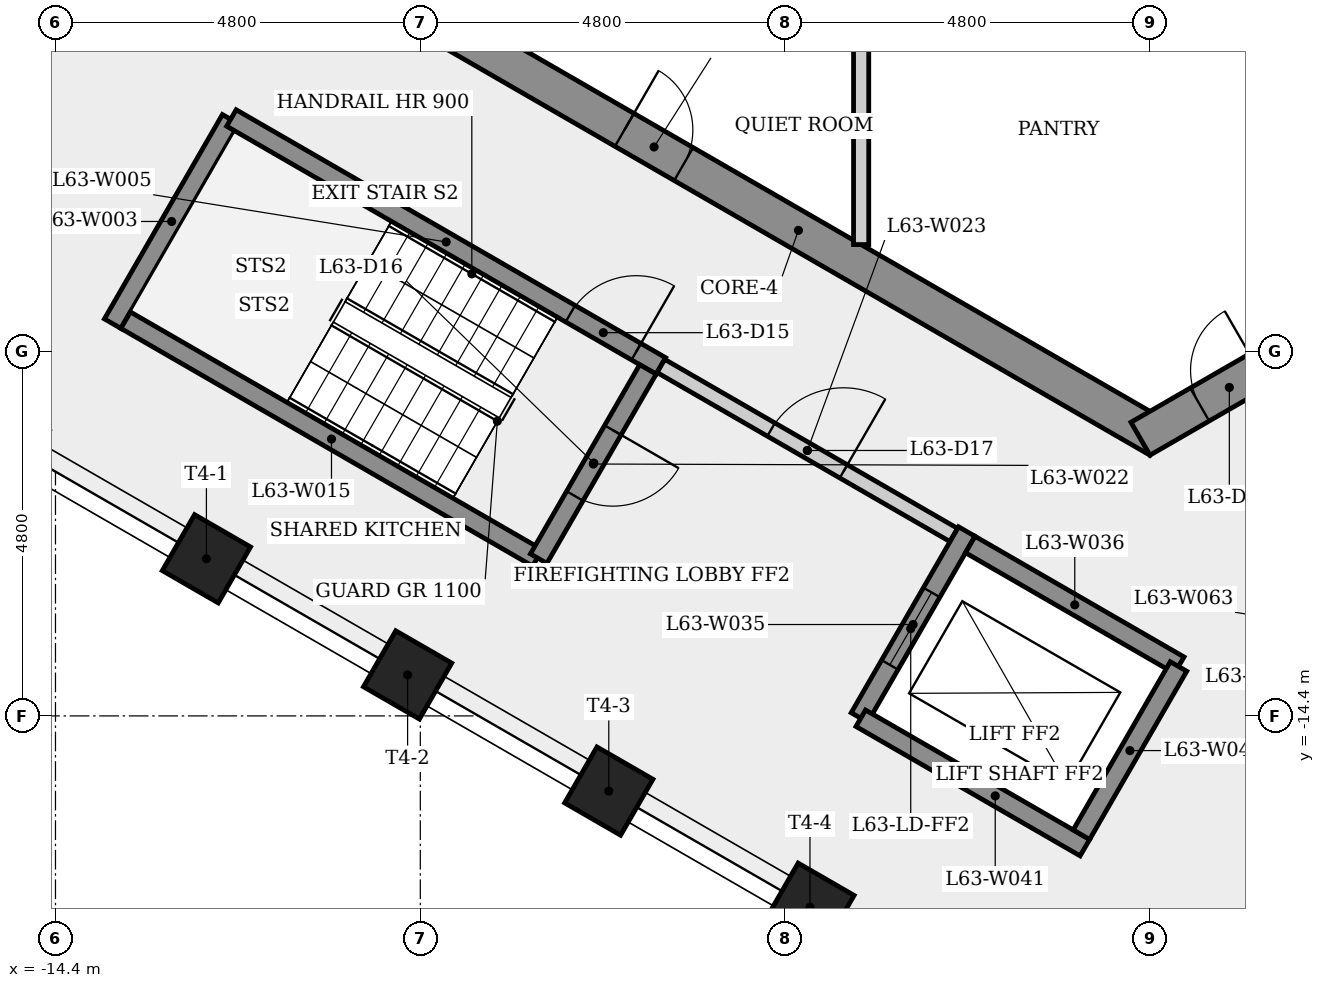
"""IFC4 building model, lengths in metres.
Left out: names, types, materials, properties, quantities, classifications, styles, units other than length and angle.
Written with IfcOpenShell. Run it as: python <this file> out.ifc"""

import sys

from ifc_helpers import new_model, si_unit, direction, frame, frame_2d, origin, origin_2d, place, context, subcontext, project, spatial, rectangle, extrude, element, fill, save


model = new_model("IFC4")
c1 = context("Model", 3, precision=1e-05, world=origin(), true_north=direction((0.0, 1.0)))
c2 = subcontext(c1, "Body", "Model", "MODEL_VIEW")
j1 = project(units=[si_unit("LENGTHUNIT", "METRE"), si_unit("PLANEANGLEUNIT", "RADIAN")], contexts=[c1])
p1 = place(None, origin())
s1 = spatial("IfcSite", under=j1, at=p1, CompositionType="ELEMENT")
p2 = place(p1, origin())
s2 = spatial("IfcBuilding", under=s1, at=p2, CompositionType="ELEMENT")
p3 = place(p2, frame((0.0, 0.0, 235.9)))
s3 = spatial("IfcBuildingStorey", under=s2, at=p3, CompositionType="ELEMENT", Elevation=235.9)
p4 = place(p3, frame((-9.375, -5.268, 0.0), z_axis=(0.0, 0.0, 1.0), x_axis=(0.866023993627, -0.500002442456, 0.0)))
e1 = element("IfcWall", 1, at=p4, inside=s3, PredefinedType="SHEAR", context=c2, shape_type="SweptSolid", body=[
    extrude(rectangle(XDim=10.97, YDim=0.5, at=frame_2d((5.485, 0.0))), origin(), (0.0, 0.0, 1.0), 3.4),
])
p5 = place(p4, frame((2.842, 0.0, 0.0)))
e2 = element("IfcOpeningElement", 2, at=p5, cuts=e1, PredefinedType="OPENING", context=c2, shape_type="SweptSolid", body=[
    extrude(rectangle(XDim=0.9, YDim=2.1, at=frame_2d((0.45, 1.05))), frame((0.0, 0.26, 0.0), z_axis=(0.0, -1.0, 0.0), x_axis=(1.0, 0.0, 0.0)), (0.0, 0.0, 1.0), 0.52),
])
p6 = place(p3, frame((-0.125, -10.753, 0.0), z_axis=(0.0, 0.0, 1.0), x_axis=(0.866023993627, 0.500002442456, 0.0)))
e3 = element("IfcWall", 3, at=p6, inside=s3, PredefinedType="SHEAR", context=c2, shape_type="SweptSolid", body=[
    extrude(rectangle(XDim=10.97, YDim=0.5, at=frame_2d((5.485, 0.0))), origin(), (0.0, 0.0, 1.0), 3.4),
])
p7 = place(p6, frame((0.9, 0.0, 0.0)))
e4 = element("IfcOpeningElement", 4, at=p7, cuts=e3, PredefinedType="OPENING", context=c2, shape_type="SweptSolid", body=[
    extrude(rectangle(XDim=0.9, YDim=2.1, at=frame_2d((0.45, 1.05))), frame((0.0, 0.26, 0.0), z_axis=(0.0, -1.0, 0.0), x_axis=(1.0, 0.0, 0.0)), (0.0, 0.0, 1.0), 0.52),
])
p8 = place(p6, frame((7.542, 0.0, 0.0)))
e5 = element("IfcOpeningElement", 5, at=p8, cuts=e3, PredefinedType="OPENING", context=c2, shape_type="SweptSolid", body=[
    extrude(rectangle(XDim=0.9, YDim=2.1, at=frame_2d((0.45, 1.05))), frame((0.0, 0.26, 0.0), z_axis=(0.0, -1.0, 0.0), x_axis=(1.0, 0.0, 0.0)), (0.0, 0.0, 1.0), 0.52),
])
for number, where, z_axis, x_axis in (
    (6, (-12.414, -12.333, 0.0), (0.0, 0.0, 1.0), (-0.5, -0.866, 0.0)),
    (7, (-9.767, -13.861, 0.0), (0.0, 0.0, 1.0), (-0.5, -0.866, 0.0)),
    (8, (-7.12, -15.389, 0.0), (0.0, 0.0, 1.0), (-0.5, -0.866, 0.0)),
    (9, (-4.473, -16.917, 0.0), (0.0, 0.0, 1.0), (-0.5, -0.866, 0.0)),
):
    element("IfcColumn", number, at=place(p3, frame(where, z_axis=z_axis, x_axis=x_axis)), inside=s3, PredefinedType="COLUMN", context=c2, shape_type="SweptSolid", body=[
        extrude(rectangle(XDim=0.85, YDim=0.85, at=origin_2d()), origin(), (0.0, 0.0, 1.0), 3.4),
    ])
p9 = place(p3, frame((-13.648, -9.239, 0.0), z_axis=(0.0, 0.0, 1.0), x_axis=(0.500003782172, 0.866023220135, 0.0)))
e10 = element("IfcWall", 10, at=p9, inside=s3, PredefinedType="SHEAR", context=c2, shape_type="SweptSolid", body=[
    extrude(rectangle(XDim=3.105, YDim=0.25, at=frame_2d((1.552, 0.0))), origin(), (0.0, 0.0, 1.0), 3.05),
])
p10 = place(p3, frame((-12.085, -6.532, 0.0), z_axis=(0.0, 0.0, 1.0), x_axis=(0.866031063448, -0.499990197047, 0.0)))
e11 = element("IfcWall", 11, at=p10, inside=s3, PredefinedType="SHEAR", context=c2, shape_type="SweptSolid", body=[
    extrude(rectangle(XDim=6.525, YDim=0.25, at=frame_2d((3.263, 0.0))), origin(), (0.0, 0.0, 1.0), 3.05),
])
p11 = place(p10, frame((5.15, 0.0, 0.0)))
e12 = element("IfcOpeningElement", 12, at=p11, cuts=e11, PredefinedType="OPENING", context=c2, shape_type="SweptSolid", body=[
    extrude(rectangle(XDim=1.0, YDim=2.1, at=frame_2d((0.5, 1.05))), frame((0.0, 0.135, 0.0), z_axis=(0.0, -1.0, 0.0), x_axis=(1.0, 0.0, 0.0)), (0.0, 0.0, 1.0), 0.27),
])
p12 = place(p3, frame((-8.06, -12.321, 0.0), z_axis=(0.0, 0.0, 1.0), x_axis=(-0.866029591389, 0.499992746786, 0.0)))
e13 = element("IfcWall", 13, at=p12, inside=s3, PredefinedType="SHEAR", context=c2, shape_type="SweptSolid", body=[
    extrude(rectangle(XDim=6.255, YDim=0.25, at=frame_2d((3.127, 0.0))), origin(), (0.0, 0.0, 1.0), 3.05),
])
p13 = place(p3, frame((-6.605, -9.841, 0.0), z_axis=(0.0, 0.0, 1.0), x_axis=(-0.500011588718, -0.866018712932, 0.0)))
e14 = element("IfcWall", 14, at=p13, inside=s3, PredefinedType="SHEAR", context=c2, shape_type="SweptSolid", body=[
    extrude(rectangle(XDim=2.875, YDim=0.25, at=frame_2d((1.438, 0.0))), origin(), (0.0, 0.0, 1.0), 3.05),
])
p14 = place(p13, frame((0.923, 0.0, 0.0)))
e15 = element("IfcOpeningElement", 15, at=p14, cuts=e14, PredefinedType="OPENING", context=c2, shape_type="SweptSolid", body=[
    extrude(rectangle(XDim=1.0, YDim=2.1, at=frame_2d((0.5, 1.05))), frame((0.0, 0.135, 0.0), z_axis=(0.0, -1.0, 0.0), x_axis=(1.0, 0.0, 0.0)), (0.0, 0.0, 1.0), 0.27),
])
p15 = place(p3, frame((-6.435, -9.795, 0.0), z_axis=(0.0, 0.0, 1.0), x_axis=(0.866012907634, -0.500021643343, 0.0)))
e16 = element("IfcWall", 16, at=p15, inside=s3, PredefinedType="PARTITIONING", context=c2, shape_type="SweptSolid", body=[
    extrude(rectangle(XDim=4.45, YDim=0.2, at=frame_2d((2.225, 0.0))), origin(), (0.0, 0.0, 1.0), 3.05),
])
p16 = place(p15, frame((1.675, 0.0, 0.0)))
e17 = element("IfcOpeningElement", 17, at=p16, cuts=e16, PredefinedType="OPENING", context=c2, shape_type="SweptSolid", body=[
    extrude(rectangle(XDim=1.1, YDim=2.1, at=frame_2d((0.55, 1.05))), frame((0.0, 0.11, 0.0), z_axis=(0.0, -1.0, 0.0), x_axis=(1.0, 0.0, 0.0)), (0.0, 0.0, 1.0), 0.22),
])
p17 = place(p3, frame((-3.8, -5.25, 0.0), z_axis=(0.0, 0.0, 1.0), x_axis=(0.0, -1.0, 0.0)))
e18 = element("IfcWall", 18, at=p17, inside=s3, PredefinedType="PARTITIONING", context=c2, shape_type="SweptSolid", body=[
    extrude(rectangle(XDim=2.948, YDim=0.2, at=frame_2d((1.474, 0.0))), origin(), (0.0, 0.0, 1.0), 3.05),
])
p18 = place(p3, frame((-2.41, -11.974, 0.0), z_axis=(0.0, 0.0, 1.0), x_axis=(-0.49998675294, -0.866033051843, 0.0)))
e19 = element("IfcWall", 19, at=p18, inside=s3, PredefinedType="SHEAR", context=c2, shape_type="SweptSolid", body=[
    extrude(rectangle(XDim=2.825, YDim=0.25, at=frame_2d((1.413, 0.0))), origin(), (0.0, 0.0, 1.0), 3.05),
])
p19 = place(p18, frame((0.926, 0.0, 0.0)))
e20 = element("IfcOpeningElement", 20, at=p19, cuts=e19, PredefinedType="OPENING", context=c2, shape_type="SweptSolid", body=[
    extrude(rectangle(XDim=1.1, YDim=2.1, at=frame_2d((0.55, 1.05))), frame((0.0, 0.135, 0.0), z_axis=(0.0, -1.0, 0.0), x_axis=(1.0, 0.0, 0.0)), (0.0, 0.0, 1.0), 0.27),
])
p20 = place(p3, frame((-2.364, -12.145, 0.0), z_axis=(0.0, 0.0, 1.0), x_axis=(0.866048579423, -0.499959856469, 0.0)))
e21 = element("IfcWall", 21, at=p20, inside=s3, PredefinedType="SHEAR", context=c2, shape_type="SweptSolid", body=[
    extrude(rectangle(XDim=3.175, YDim=0.25, at=frame_2d((1.587, 0.0))), origin(), (0.0, 0.0, 1.0), 3.4),
])
p21 = place(p3, frame((-0.856, -16.133, 0.0), z_axis=(0.0, 0.0, 1.0), x_axis=(-0.866032748241, 0.499987278812, 0.0)))
e22 = element("IfcWall", 22, at=p21, inside=s3, PredefinedType="SHEAR", context=c2, shape_type="SweptSolid", body=[
    extrude(rectangle(XDim=3.405, YDim=0.25, at=frame_2d((1.702, 0.0))), origin(), (0.0, 0.0, 1.0), 3.05),
])
p22 = place(p3, frame((0.375, -13.75, 0.0), z_axis=(0.0, 0.0, 1.0), x_axis=(-0.50003400563, -0.866005769735, 0.0)))
e23 = element("IfcWall", 23, at=p22, inside=s3, PredefinedType="SHEAR", context=c2, shape_type="SweptSolid", body=[
    extrude(rectangle(XDim=2.555, YDim=0.25, at=frame_2d((1.277, 0.0))), origin(), (0.0, 0.0, 1.0), 3.4),
])
p23 = place(p11, origin())
e24 = element("IfcDoor", 24, at=p23, inside=s3, OperationType="SINGLE_SWING_RIGHT", PredefinedType="DOOR", context=c2, shape_type="SweptSolid", body=[
    extrude(rectangle(XDim=1.0, YDim=2.1, at=frame_2d((0.5, 1.05))), frame((0.0, 0.025, 0.0), z_axis=(0.0, -1.0, 0.0), x_axis=(1.0, 0.0, 0.0)), (0.0, 0.0, 1.0), 0.05),
])
fill(e12, e24)
p24 = place(p14, origin())
e25 = element("IfcDoor", 25, at=p24, inside=s3, OperationType="SINGLE_SWING_LEFT", PredefinedType="DOOR", context=c2, shape_type="SweptSolid", body=[
    extrude(rectangle(XDim=1.0, YDim=2.1, at=frame_2d((0.5, 1.05))), frame((0.0, 0.025, 0.0), z_axis=(0.0, -1.0, 0.0), x_axis=(1.0, 0.0, 0.0)), (0.0, 0.0, 1.0), 0.05),
])
fill(e15, e25)
p25 = place(p16, origin())
e26 = element("IfcDoor", 26, at=p25, inside=s3, OperationType="SINGLE_SWING_RIGHT", PredefinedType="DOOR", context=c2, shape_type="SweptSolid", body=[
    extrude(rectangle(XDim=1.1, YDim=2.1, at=frame_2d((0.55, 1.05))), frame((0.0, 0.025, 0.0), z_axis=(0.0, -1.0, 0.0), x_axis=(1.0, 0.0, 0.0)), (0.0, 0.0, 1.0), 0.05),
])
fill(e17, e26)
p26 = place(p19, origin())
e27 = element("IfcDoor", 27, at=p26, inside=s3, OperationType="SLIDING_TO_LEFT", PredefinedType="DOOR", context=c2, shape_type="SweptSolid", body=[
    extrude(rectangle(XDim=1.1, YDim=2.1, at=frame_2d((0.55, 1.05))), frame((0.0, 0.025, 0.0), z_axis=(0.0, -1.0, 0.0), x_axis=(1.0, 0.0, 0.0)), (0.0, 0.0, 1.0), 0.05),
])
fill(e20, e27)
p27 = place(p5, origin())
e28 = element("IfcDoor", 28, at=p27, inside=s3, OperationType="SINGLE_SWING_LEFT", PredefinedType="DOOR", context=c2, shape_type="SweptSolid", body=[
    extrude(rectangle(XDim=0.9, YDim=2.1, at=frame_2d((0.45, 1.05))), frame((0.0, 0.025, 0.0), z_axis=(0.0, -1.0, 0.0), x_axis=(1.0, 0.0, 0.0)), (0.0, 0.0, 1.0), 0.05),
])
fill(e2, e28)
p28 = place(p7, origin())
e29 = element("IfcDoor", 29, at=p28, inside=s3, OperationType="SINGLE_SWING_RIGHT", PredefinedType="DOOR", context=c2, shape_type="SweptSolid", body=[
    extrude(rectangle(XDim=0.9, YDim=2.1, at=frame_2d((0.45, 1.05))), frame((0.0, 0.025, 0.0), z_axis=(0.0, -1.0, 0.0), x_axis=(1.0, 0.0, 0.0)), (0.0, 0.0, 1.0), 0.05),
])
fill(e4, e29)
save(model, sys.argv[1])
